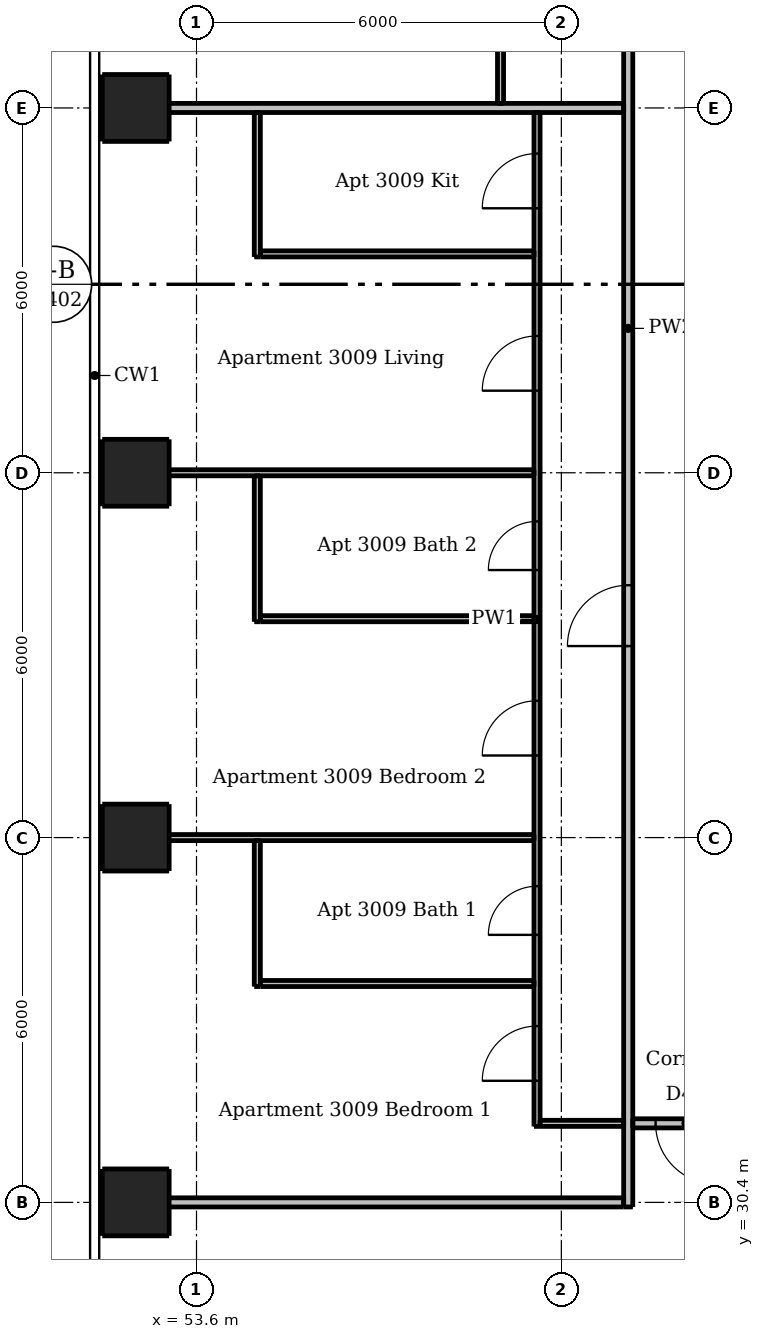
"""IFC4 building model, lengths in metres.
Left out: names, types, materials, properties, quantities, classifications, styles, units other than length and angle.
Written with IfcOpenShell. Run it as: python <this file> out.ifc"""

import sys

from ifc_helpers import new_model, si_unit, direction, frame, frame_2d, origin, origin_2d, place, context, subcontext, project, spatial, rectangle, extrude, element, fill, save


model = new_model("IFC4")
c1 = context("Model", 3, precision=1e-05, world=origin(), true_north=direction((0.0, 1.0)))
c2 = subcontext(c1, "Body", "Model", "MODEL_VIEW")
j1 = project(units=[si_unit("LENGTHUNIT", "METRE"), si_unit("PLANEANGLEUNIT", "RADIAN")], contexts=[c1])
p1 = place(None, origin())
s1 = spatial("IfcSite", under=j1, at=p1, CompositionType="ELEMENT")
p2 = place(p1, origin())
s2 = spatial("IfcBuilding", under=s1, at=p2, CompositionType="ELEMENT")
p3 = place(p2, frame((0.0, 0.0, 111.7)))
s3 = spatial("IfcBuildingStorey", under=s2, at=p3, CompositionType="ELEMENT", Elevation=111.7)
for number, where, z_axis, x_axis in (
    (1, (52.6, 30.4, 0.0), (0.0, 0.0, 1.0), (1.0, 0.0, 0.0)),
    (2, (52.6, 36.4, 0.0), (0.0, 0.0, 1.0), (1.0, 0.0, 0.0)),
    (3, (52.6, 42.4, 0.0), (0.0, 0.0, 1.0), (1.0, 0.0, 0.0)),
    (4, (52.6, 48.4, 0.0), (0.0, 0.0, 1.0), (1.0, 0.0, 0.0)),
):
    element("IfcColumn", number, at=place(p3, frame(where, z_axis=z_axis, x_axis=x_axis)), inside=s3, PredefinedType="COLUMN", context=c2, shape_type="SweptSolid", body=[
        extrude(rectangle(XDim=1.1, YDim=1.1, at=origin_2d()), origin(), (0.0, 0.0, 1.0), 3.05),
    ])
for number, where, z_axis, x_axis in (
    (5, (54.6, 33.95, 0.0), (0.0, 0.0, 1.0), (0.0, 1.0, 0.0)),
    (6, (54.6, 39.95, 0.0), (0.0, 0.0, 1.0), (0.0, 1.0, 0.0)),
):
    element("IfcWall", number, at=place(p3, frame(where, z_axis=z_axis, x_axis=x_axis)), inside=s3, PredefinedType="PARTITIONING", context=c2, shape_type="SweptSolid", body=[
        extrude(rectangle(XDim=2.4, YDim=0.1, at=frame_2d((1.2, 0.0))), origin(), (0.0, 0.0, 1.0), 3.05),
    ])
p4 = place(p3, frame((54.6, 45.95, 0.0), z_axis=(0.0, 0.0, 1.0), x_axis=(0.0, 1.0, 0.0)))
e7 = element("IfcWall", 7, at=p4, inside=s3, PredefinedType="PARTITIONING", context=c2, shape_type="SweptSolid", body=[
    extrude(rectangle(XDim=2.375, YDim=0.1, at=frame_2d((1.188, 0.0))), origin(), (0.0, 0.0, 1.0), 3.05),
])
p5 = place(p3, frame((58.6, 54.35, 0.0), z_axis=(0.0, 0.0, 1.0), x_axis=(0.0, -1.0, 0.0)))
e8 = element("IfcWall", 8, at=p5, inside=s3, PredefinedType="PARTITIONING", context=c2, shape_type="SweptSolid", body=[
    extrude(rectangle(XDim=5.875, YDim=0.1, at=frame_2d((2.938, 0.0))), origin(), (0.0, 0.0, 1.0), 3.05),
])
p6 = place(p5, frame((3.75, 0.0, 0.0)))
e9 = element("IfcOpeningElement", 9, at=p6, cuts=e8, PredefinedType="OPENING", context=c2, shape_type="SweptSolid", body=[
    extrude(rectangle(XDim=0.8, YDim=2.1, at=frame_2d((0.4, 1.05))), frame((0.0, 0.06, 0.0), z_axis=(0.0, -1.0, 0.0), x_axis=(1.0, 0.0, 0.0)), (0.0, 0.0, 1.0), 0.12),
])
p7 = place(p3, frame((59.2, 31.65, 0.0), z_axis=(0.0, 0.0, 1.0), x_axis=(0.0, 1.0, 0.0)))
e10 = element("IfcWall", 10, at=p7, inside=s3, PredefinedType="PARTITIONING", context=c2, shape_type="SweptSolid", body=[
    extrude(rectangle(XDim=16.675, YDim=0.1, at=frame_2d((8.337, 0.0))), origin(), (0.0, 0.0, 1.0), 3.05),
])
p8 = place(p7, frame((12.1, 0.0, 0.0)))
e11 = element("IfcOpeningElement", 11, at=p8, cuts=e10, PredefinedType="OPENING", context=c2, shape_type="SweptSolid", body=[
    extrude(rectangle(XDim=0.9, YDim=2.1, at=frame_2d((0.45, 1.05))), frame((0.0, 0.06, 0.0), z_axis=(0.0, -1.0, 0.0), x_axis=(1.0, 0.0, 0.0)), (0.0, 0.0, 1.0), 0.12),
])
p9 = place(p7, frame((15.1, 0.0, 0.0)))
e12 = element("IfcOpeningElement", 12, at=p9, cuts=e10, PredefinedType="OPENING", context=c2, shape_type="SweptSolid", body=[
    extrude(rectangle(XDim=0.9, YDim=2.1, at=frame_2d((0.45, 1.05))), frame((0.0, 0.06, 0.0), z_axis=(0.0, -1.0, 0.0), x_axis=(1.0, 0.0, 0.0)), (0.0, 0.0, 1.0), 0.12),
])
p10 = place(p7, frame((0.75, 0.0, 0.0)))
e13 = element("IfcOpeningElement", 13, at=p10, cuts=e10, PredefinedType="OPENING", context=c2, shape_type="SweptSolid", body=[
    extrude(rectangle(XDim=0.9, YDim=2.1, at=frame_2d((0.45, 1.05))), frame((0.0, 0.06, 0.0), z_axis=(0.0, -1.0, 0.0), x_axis=(1.0, 0.0, 0.0)), (0.0, 0.0, 1.0), 0.12),
])
p11 = place(p7, frame((6.1, 0.0, 0.0)))
e14 = element("IfcOpeningElement", 14, at=p11, cuts=e10, PredefinedType="OPENING", context=c2, shape_type="SweptSolid", body=[
    extrude(rectangle(XDim=0.9, YDim=2.1, at=frame_2d((0.45, 1.05))), frame((0.0, 0.06, 0.0), z_axis=(0.0, -1.0, 0.0), x_axis=(1.0, 0.0, 0.0)), (0.0, 0.0, 1.0), 0.12),
])
p12 = place(p7, frame((3.15, 0.0, 0.0)))
e15 = element("IfcOpeningElement", 15, at=p12, cuts=e10, PredefinedType="OPENING", context=c2, shape_type="SweptSolid", body=[
    extrude(rectangle(XDim=0.8, YDim=2.1, at=frame_2d((0.4, 1.05))), frame((0.0, 0.06, 0.0), z_axis=(0.0, -1.0, 0.0), x_axis=(1.0, 0.0, 0.0)), (0.0, 0.0, 1.0), 0.12),
])
p13 = place(p7, frame((9.15, 0.0, 0.0)))
e16 = element("IfcOpeningElement", 16, at=p13, cuts=e10, PredefinedType="OPENING", context=c2, shape_type="SweptSolid", body=[
    extrude(rectangle(XDim=0.8, YDim=2.1, at=frame_2d((0.4, 1.05))), frame((0.0, 0.06, 0.0), z_axis=(0.0, -1.0, 0.0), x_axis=(1.0, 0.0, 0.0)), (0.0, 0.0, 1.0), 0.12),
])
p14 = place(p3, frame((54.65, 46.0, 0.0), z_axis=(0.0, 0.0, 1.0), x_axis=(1.0, 0.0, 0.0)))
e17 = element("IfcWall", 17, at=p14, inside=s3, PredefinedType="PARTITIONING", context=c2, shape_type="SweptSolid", body=[
    extrude(rectangle(XDim=4.5, YDim=0.1, at=frame_2d((2.25, 0.0))), origin(), (0.0, 0.0, 1.0), 3.05),
])
p15 = place(p3, frame((52.0, 42.4, 0.0), z_axis=(0.0, 0.0, 1.0), x_axis=(1.0, 0.0, 0.0)))
e18 = element("IfcWall", 18, at=p15, inside=s3, PredefinedType="PARTITIONING", context=c2, shape_type="SweptSolid", body=[
    extrude(rectangle(XDim=7.15, YDim=0.1, at=frame_2d((3.575, 0.0))), origin(), (0.0, 0.0, 1.0), 2.516),
])
p16 = place(p3, frame((54.65, 40.0, 0.0), z_axis=(0.0, 0.0, 1.0), x_axis=(1.0, 0.0, 0.0)))
e19 = element("IfcWall", 19, at=p16, inside=s3, PredefinedType="PARTITIONING", context=c2, shape_type="SweptSolid", body=[
    extrude(rectangle(XDim=4.5, YDim=0.1, at=frame_2d((2.25, 0.0))), origin(), (0.0, 0.0, 1.0), 3.05),
])
p17 = place(p3, frame((52.0, 36.4, 0.0), z_axis=(0.0, 0.0, 1.0), x_axis=(1.0, 0.0, 0.0)))
e20 = element("IfcWall", 20, at=p17, inside=s3, PredefinedType="PARTITIONING", context=c2, shape_type="SweptSolid", body=[
    extrude(rectangle(XDim=7.15, YDim=0.1, at=frame_2d((3.575, 0.0))), origin(), (0.0, 0.0, 1.0), 2.516),
])
p18 = place(p3, frame((54.65, 34.0, 0.0), z_axis=(0.0, 0.0, 1.0), x_axis=(1.0, 0.0, 0.0)))
e21 = element("IfcWall", 21, at=p18, inside=s3, PredefinedType="PARTITIONING", context=c2, shape_type="SweptSolid", body=[
    extrude(rectangle(XDim=4.5, YDim=0.1, at=frame_2d((2.25, 0.0))), origin(), (0.0, 0.0, 1.0), 3.05),
])
p19 = place(p3, frame((59.25, 31.7, 0.0), z_axis=(0.0, 0.0, 1.0), x_axis=(1.0, 0.0, 0.0)))
e22 = element("IfcWall", 22, at=p19, inside=s3, PredefinedType="PARTITIONING", context=c2, shape_type="SweptSolid", body=[
    extrude(rectangle(XDim=1.375, YDim=0.1, at=frame_2d((0.688, 0.0))), origin(), (0.0, 0.0, 1.0), 3.05),
])
p20 = place(p3, frame((60.7, 30.325, 0.0), z_axis=(0.0, 0.0, 1.0), x_axis=(0.0, 1.0, 0.0)))
e23 = element("IfcWall", 23, at=p20, inside=s3, PredefinedType="PARTITIONING", context=c2, shape_type="SweptSolid", body=[
    extrude(rectangle(XDim=28.9, YDim=0.15, at=frame_2d((14.45, 0.0))), origin(), (0.0, 0.0, 1.0), 3.05),
])
p21 = place(p20, frame((9.225, 0.0, 0.0)))
e24 = element("IfcOpeningElement", 24, at=p21, cuts=e23, PredefinedType="OPENING", context=c2, shape_type="SweptSolid", body=[
    extrude(rectangle(XDim=1.0, YDim=2.1, at=frame_2d((0.5, 1.05))), frame((0.0, 0.085, 0.0), z_axis=(0.0, -1.0, 0.0), x_axis=(1.0, 0.0, 0.0)), (0.0, 0.0, 1.0), 0.17),
])
p22 = place(p20, frame((26.025, 0.0, 0.0)))
e25 = element("IfcOpeningElement", 25, at=p22, cuts=e23, PredefinedType="OPENING", context=c2, shape_type="SweptSolid", body=[
    extrude(rectangle(XDim=1.0, YDim=2.1, at=frame_2d((0.5, 1.05))), frame((0.0, 0.085, 0.0), z_axis=(0.0, -1.0, 0.0), x_axis=(1.0, 0.0, 0.0)), (0.0, 0.0, 1.0), 0.17),
])
p23 = place(p3, frame((52.0, 48.4, 0.0), z_axis=(0.0, 0.0, 1.0), x_axis=(1.0, 0.0, 0.0)))
e26 = element("IfcWall", 26, at=p23, inside=s3, PredefinedType="PARTITIONING", context=c2, shape_type="SweptSolid", body=[
    extrude(rectangle(XDim=8.625, YDim=0.15, at=frame_2d((4.312, 0.0))), origin(), (0.0, 0.0, 1.0), 2.516),
])
p24 = place(p3, frame((89.525, 31.7, 0.0), z_axis=(0.0, 0.0, 1.0), x_axis=(-1.0, 0.0, 0.0)))
e27 = element("IfcWall", 27, at=p24, inside=s3, PredefinedType="PARTITIONING", context=c2, shape_type="SweptSolid", body=[
    extrude(rectangle(XDim=28.75, YDim=0.15, at=frame_2d((14.375, 0.0))), origin(), (0.0, 0.0, 1.0), 3.05),
])
p25 = place(p24, frame((27.375, 0.0, 0.0)))
e28 = element("IfcOpeningElement", 28, at=p25, cuts=e27, PredefinedType="OPENING", context=c2, shape_type="SweptSolid", body=[
    extrude(rectangle(XDim=1.0, YDim=2.1, at=frame_2d((0.5, 1.05))), frame((0.0, 0.085, 0.0), z_axis=(0.0, -1.0, 0.0), x_axis=(1.0, 0.0, 0.0)), (0.0, 0.0, 1.0), 0.17),
])
p26 = place(p24, frame((12.625, 0.0, 0.0)))
e29 = element("IfcOpeningElement", 29, at=p26, cuts=e27, PredefinedType="OPENING", context=c2, shape_type="SweptSolid", body=[
    extrude(rectangle(XDim=1.0, YDim=2.1, at=frame_2d((0.5, 1.05))), frame((0.0, 0.085, 0.0), z_axis=(0.0, -1.0, 0.0), x_axis=(1.0, 0.0, 0.0)), (0.0, 0.0, 1.0), 0.17),
])
p27 = place(p24, frame((2.425, 0.0, 0.0)))
e30 = element("IfcOpeningElement", 30, at=p27, cuts=e27, PredefinedType="OPENING", context=c2, shape_type="SweptSolid", body=[
    extrude(rectangle(XDim=1.0, YDim=2.1, at=frame_2d((0.5, 1.05))), frame((0.0, 0.085, 0.0), z_axis=(0.0, -1.0, 0.0), x_axis=(1.0, 0.0, 0.0)), (0.0, 0.0, 1.0), 0.17),
])
p28 = place(p3, frame((52.0, 30.4, 0.0), z_axis=(0.0, 0.0, 1.0), x_axis=(1.0, 0.0, 0.0)))
e31 = element("IfcWall", 31, at=p28, inside=s3, PredefinedType="PARTITIONING", context=c2, shape_type="SweptSolid", body=[
    extrude(rectangle(XDim=8.625, YDim=0.15, at=frame_2d((4.312, 0.0))), origin(), (0.0, 0.0, 1.0), 2.647),
])
p29 = place(p25, origin())
e32 = element("IfcDoor", 32, at=p29, inside=s3, OperationType="SINGLE_SWING_LEFT", PredefinedType="DOOR", context=c2, shape_type="SweptSolid", body=[
    extrude(rectangle(XDim=1.0, YDim=2.1, at=frame_2d((0.5, 1.05))), frame((0.0, 0.025, 0.0), z_axis=(0.0, -1.0, 0.0), x_axis=(1.0, 0.0, 0.0)), (0.0, 0.0, 1.0), 0.05),
])
fill(e28, e32)
p30 = place(p21, origin())
e33 = element("IfcDoor", 33, at=p30, inside=s3, OperationType="SINGLE_SWING_LEFT", PredefinedType="DOOR", context=c2, shape_type="SweptSolid", body=[
    extrude(rectangle(XDim=1.0, YDim=2.1, at=frame_2d((0.5, 1.05))), frame((0.0, 0.025, 0.0), z_axis=(0.0, -1.0, 0.0), x_axis=(1.0, 0.0, 0.0)), (0.0, 0.0, 1.0), 0.05),
])
fill(e24, e33)
p31 = place(p8, origin())
e34 = element("IfcDoor", 34, at=p31, inside=s3, OperationType="SINGLE_SWING_LEFT", PredefinedType="DOOR", context=c2, shape_type="SweptSolid", body=[
    extrude(rectangle(XDim=0.9, YDim=2.1, at=frame_2d((0.45, 1.05))), frame((0.0, 0.025, 0.0), z_axis=(0.0, -1.0, 0.0), x_axis=(1.0, 0.0, 0.0)), (0.0, 0.0, 1.0), 0.05),
])
fill(e11, e34)
p32 = place(p9, origin())
e35 = element("IfcDoor", 35, at=p32, inside=s3, OperationType="SINGLE_SWING_LEFT", PredefinedType="DOOR", context=c2, shape_type="SweptSolid", body=[
    extrude(rectangle(XDim=0.9, YDim=2.1, at=frame_2d((0.45, 1.05))), frame((0.0, 0.025, 0.0), z_axis=(0.0, -1.0, 0.0), x_axis=(1.0, 0.0, 0.0)), (0.0, 0.0, 1.0), 0.05),
])
fill(e12, e35)
p33 = place(p10, origin())
e36 = element("IfcDoor", 36, at=p33, inside=s3, OperationType="SINGLE_SWING_LEFT", PredefinedType="DOOR", context=c2, shape_type="SweptSolid", body=[
    extrude(rectangle(XDim=0.9, YDim=2.1, at=frame_2d((0.45, 1.05))), frame((0.0, 0.025, 0.0), z_axis=(0.0, -1.0, 0.0), x_axis=(1.0, 0.0, 0.0)), (0.0, 0.0, 1.0), 0.05),
])
fill(e13, e36)
p34 = place(p11, origin())
e37 = element("IfcDoor", 37, at=p34, inside=s3, OperationType="SINGLE_SWING_LEFT", PredefinedType="DOOR", context=c2, shape_type="SweptSolid", body=[
    extrude(rectangle(XDim=0.9, YDim=2.1, at=frame_2d((0.45, 1.05))), frame((0.0, 0.025, 0.0), z_axis=(0.0, -1.0, 0.0), x_axis=(1.0, 0.0, 0.0)), (0.0, 0.0, 1.0), 0.05),
])
fill(e14, e37)
p35 = place(p12, origin())
e38 = element("IfcDoor", 38, at=p35, inside=s3, OperationType="SINGLE_SWING_LEFT", PredefinedType="DOOR", context=c2, shape_type="SweptSolid", body=[
    extrude(rectangle(XDim=0.8, YDim=2.1, at=frame_2d((0.4, 1.05))), frame((0.0, 0.025, 0.0), z_axis=(0.0, -1.0, 0.0), x_axis=(1.0, 0.0, 0.0)), (0.0, 0.0, 1.0), 0.05),
])
fill(e15, e38)
p36 = place(p13, origin())
e39 = element("IfcDoor", 39, at=p36, inside=s3, OperationType="SINGLE_SWING_LEFT", PredefinedType="DOOR", context=c2, shape_type="SweptSolid", body=[
    extrude(rectangle(XDim=0.8, YDim=2.1, at=frame_2d((0.4, 1.05))), frame((0.0, 0.025, 0.0), z_axis=(0.0, -1.0, 0.0), x_axis=(1.0, 0.0, 0.0)), (0.0, 0.0, 1.0), 0.05),
])
fill(e16, e39)
save(model, sys.argv[1])
